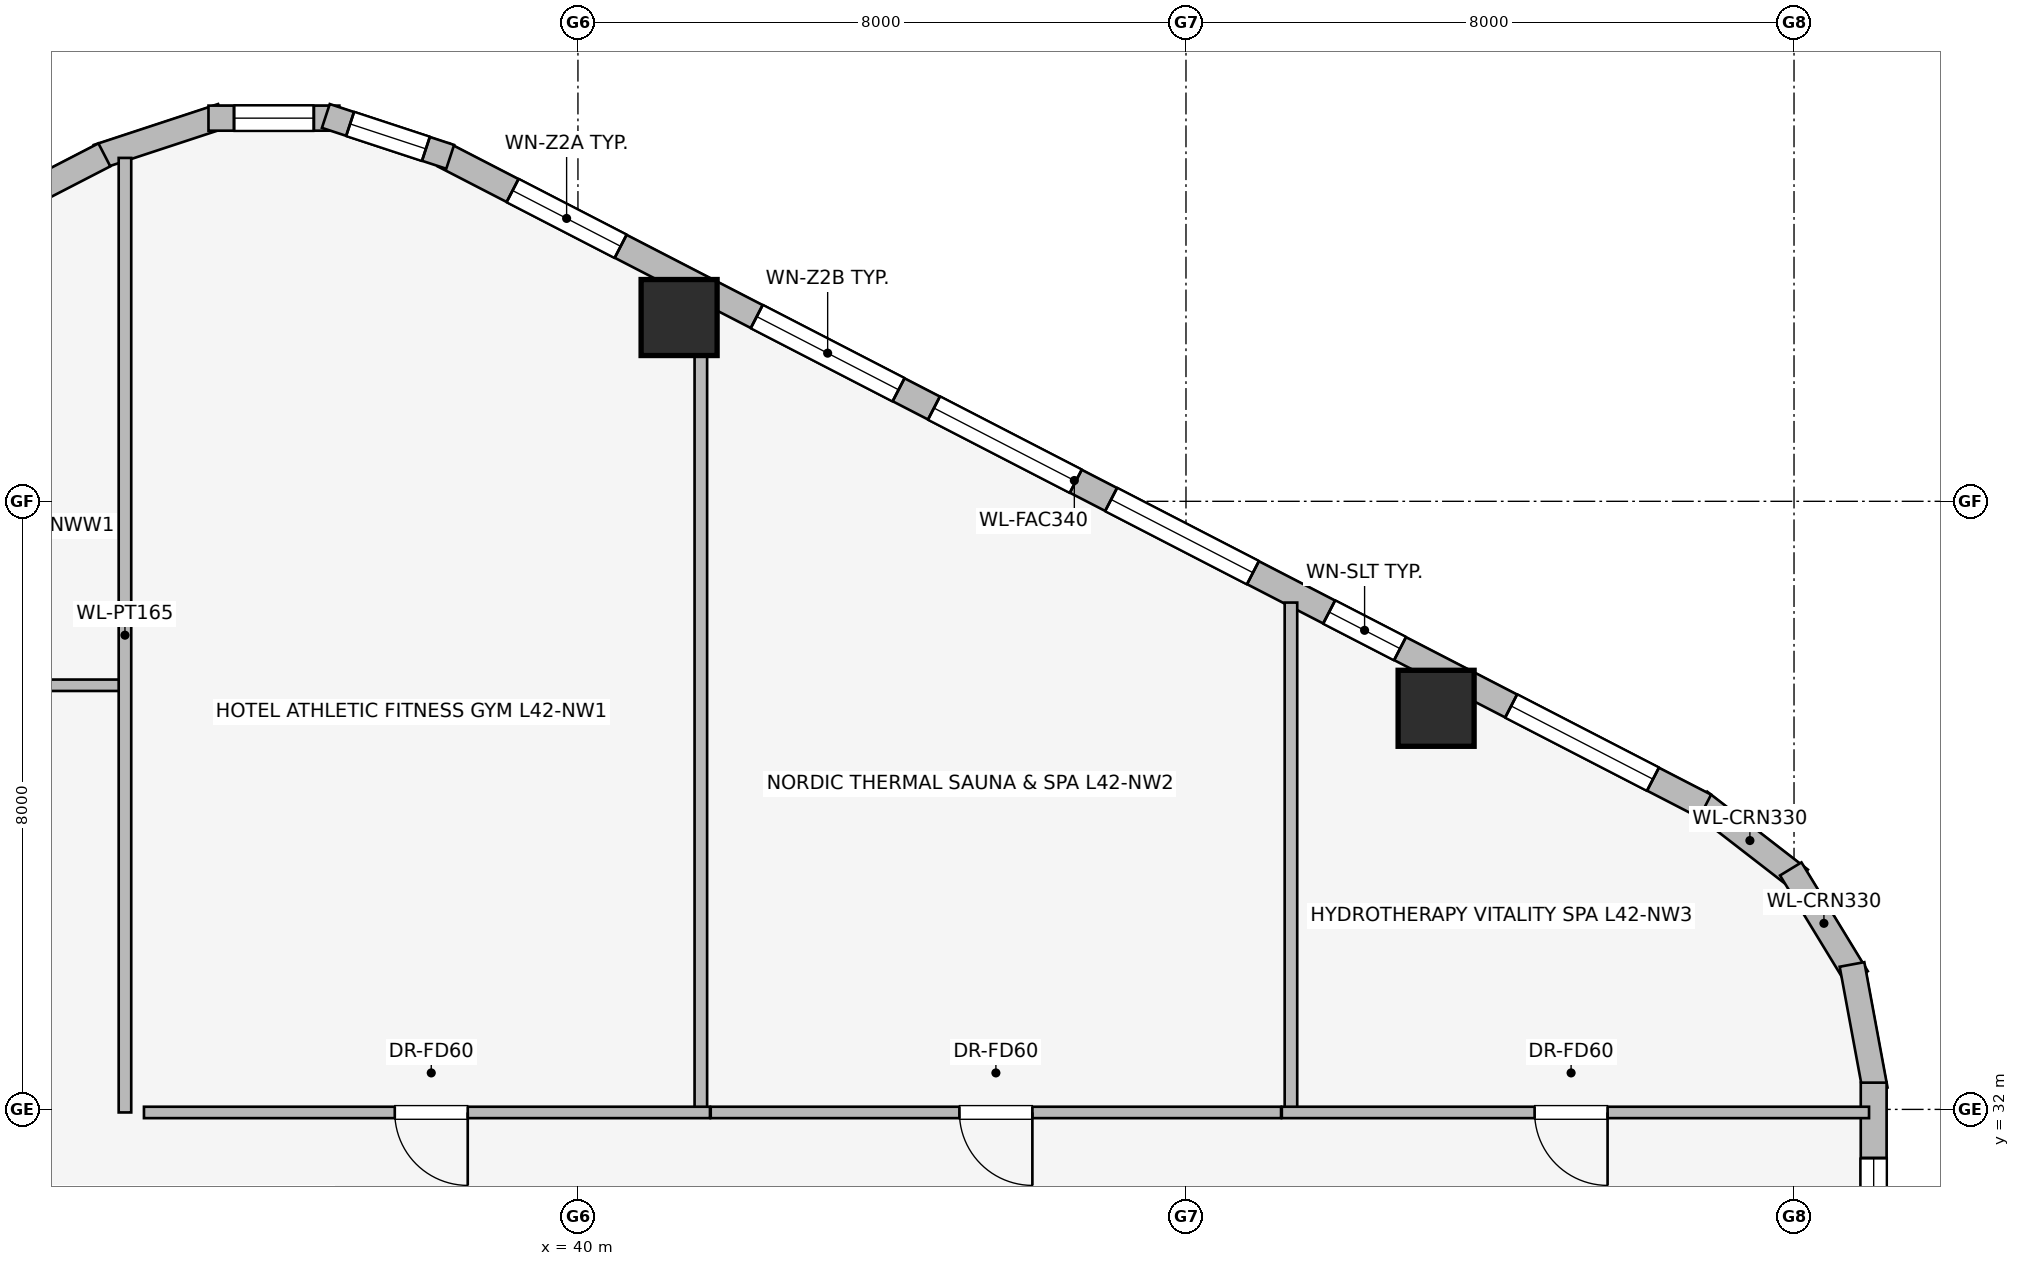
"""IFC4 building model, lengths in metres.
Left out: names, types, materials, properties, quantities, classifications, styles, units other than length and angle.
Written with IfcOpenShell. Run it as: python <this file> out.ifc"""

import sys

from ifc_helpers import new_model, si_unit, direction, frame, frame_2d, origin, origin_2d, place, context, subcontext, project, spatial, rectangle, extrude, element, fill, save


model = new_model("IFC4")
c1 = context("Model", 3, precision=1e-05, world=origin(), true_north=direction((0.0, 1.0)))
c2 = subcontext(c1, "Body", "Model", "MODEL_VIEW")
j1 = project(units=[si_unit("LENGTHUNIT", "METRE"), si_unit("PLANEANGLEUNIT", "RADIAN")], contexts=[c1])
p1 = place(None, origin())
s1 = spatial("IfcSite", under=j1, at=p1, CompositionType="ELEMENT")
p2 = place(p1, origin())
s2 = spatial("IfcBuilding", under=s1, at=p2, CompositionType="ELEMENT")
p3 = place(p2, frame((0.0, 0.0, 156.75)))
s3 = spatial("IfcBuildingStorey", under=s2, at=p3, CompositionType="ELEMENT", Elevation=156.75)
for number, where, z_axis, x_axis in (
    (1, (51.291, 37.277, 0.0), (0.0, 0.0, 1.0), (1.0, 0.0, 0.0)),
    (2, (41.331, 42.418, 0.0), (0.0, 0.0, 1.0), (1.0, 0.0, 0.0)),
):
    element("IfcColumn", number, at=place(p3, frame(where, z_axis=z_axis, x_axis=x_axis)), inside=s3, PredefinedType="COLUMN", context=c2, shape_type="SweptSolid", body=[
        extrude(rectangle(XDim=1.0, YDim=1.0, at=origin_2d()), origin(), (0.0, 0.0, 1.0), 3.45),
    ])
p4 = place(p3, frame((54.757, 36.05, 0.0), z_axis=(0.0, 0.0, 1.0), x_axis=(0.790621329885, -0.612305408053, 0.0)))
e3 = element("IfcWall", 3, at=p4, inside=s3, PredefinedType="STANDARD", context=c2, shape_type="SweptSolid", body=[
    extrude(rectangle(XDim=1.676, YDim=0.33, at=frame_2d((0.838, 0.0))), origin(), (0.0, 0.0, 1.0), 3.19),
])
p5 = place(p3, frame((55.957, 35.164, 0.0), z_axis=(0.0, 0.0, 1.0), x_axis=(0.520519429557, -0.853849824883, 0.0)))
e4 = element("IfcWall", 4, at=p5, inside=s3, PredefinedType="STANDARD", context=c2, shape_type="SweptSolid", body=[
    extrude(rectangle(XDim=1.677, YDim=0.33, at=frame_2d((0.839, 0.0))), origin(), (0.0, 0.0, 1.0), 3.19),
])
p6 = place(p3, frame((56.763, 33.907, 0.0), z_axis=(0.0, 0.0, 1.0), x_axis=(0.181984991895, -0.983301308209, 0.0)))
e5 = element("IfcWall", 5, at=p6, inside=s3, PredefinedType="STANDARD", context=c2, shape_type="SweptSolid", body=[
    extrude(rectangle(XDim=1.677, YDim=0.33, at=frame_2d((0.838, 0.0))), origin(), (0.0, 0.0, 1.0), 3.19),
])
p7 = place(p3, frame((38.231, 44.558, 0.0), z_axis=(0.0, 0.0, 1.0), x_axis=(0.888613612362, -0.458656568606, 0.0)))
e6 = element("IfcWall", 6, at=p7, inside=s3, PredefinedType="STANDARD", context=c2, shape_type="SweptSolid", body=[
    extrude(rectangle(XDim=18.681, YDim=0.34, at=frame_2d((9.34, 0.0))), origin(), (0.0, 0.0, 1.0), 3.19),
])
p8 = place(p7, frame((1.023, 0.0, 0.75)))
e7 = element("IfcOpeningElement", 7, at=p8, cuts=e6, PredefinedType="OPENING", context=c2, shape_type="SweptSolid", body=[
    extrude(rectangle(XDim=1.6, YDim=1.55, at=frame_2d((0.8, 0.775))), frame((0.0, 0.18, 0.0), z_axis=(0.0, -1.0, 0.0), x_axis=(1.0, 0.0, 0.0)), (0.0, 0.0, 1.0), 0.36),
])
p9 = place(p7, frame((4.638, 0.0, 0.75)))
e8 = element("IfcOpeningElement", 8, at=p9, cuts=e6, PredefinedType="OPENING", context=c2, shape_type="SweptSolid", body=[
    extrude(rectangle(XDim=2.1, YDim=1.5, at=frame_2d((1.05, 0.75))), frame((0.0, 0.18, 0.0), z_axis=(0.0, -1.0, 0.0), x_axis=(1.0, 0.0, 0.0)), (0.0, 0.0, 1.0), 0.36),
])
p10 = place(p7, frame((7.262, 0.0, 0.75)))
e9 = element("IfcOpeningElement", 9, at=p10, cuts=e6, PredefinedType="OPENING", context=c2, shape_type="SweptSolid", body=[
    extrude(rectangle(XDim=2.1, YDim=1.5, at=frame_2d((1.05, 0.75))), frame((0.0, 0.18, 0.0), z_axis=(0.0, -1.0, 0.0), x_axis=(1.0, 0.0, 0.0)), (0.0, 0.0, 1.0), 0.36),
])
p11 = place(p7, frame((9.885, 0.0, 0.75)))
e10 = element("IfcOpeningElement", 10, at=p11, cuts=e6, PredefinedType="OPENING", context=c2, shape_type="SweptSolid", body=[
    extrude(rectangle(XDim=2.1, YDim=1.5, at=frame_2d((1.05, 0.75))), frame((0.0, 0.18, 0.0), z_axis=(0.0, -1.0, 0.0), x_axis=(1.0, 0.0, 0.0)), (0.0, 0.0, 1.0), 0.36),
])
p12 = place(p7, frame((13.113, 0.0, 0.75)))
e11 = element("IfcOpeningElement", 11, at=p12, cuts=e6, PredefinedType="OPENING", context=c2, shape_type="SweptSolid", body=[
    extrude(rectangle(XDim=1.05, YDim=1.4, at=frame_2d((0.525, 0.7))), frame((0.0, 0.18, 0.0), z_axis=(0.0, -1.0, 0.0), x_axis=(1.0, 0.0, 0.0)), (0.0, 0.0, 1.0), 0.36),
])
p13 = place(p7, frame((15.808, 0.0, 0.75)))
e12 = element("IfcOpeningElement", 12, at=p13, cuts=e6, PredefinedType="OPENING", context=c2, shape_type="SweptSolid", body=[
    extrude(rectangle(XDim=2.1, YDim=1.5, at=frame_2d((1.05, 0.75))), frame((0.0, 0.18, 0.0), z_axis=(0.0, -1.0, 0.0), x_axis=(1.0, 0.0, 0.0)), (0.0, 0.0, 1.0), 0.36),
])
p14 = place(p3, frame((33.681, 44.532, 0.0), z_axis=(0.0, 0.0, 1.0), x_axis=(0.949937416267, 0.312440242569, 0.0)))
e13 = element("IfcWall", 13, at=p14, inside=s3, PredefinedType="STANDARD", context=c2, shape_type="SweptSolid", body=[
    extrude(rectangle(XDim=1.722, YDim=0.33, at=frame_2d((0.861, 0.0))), origin(), (0.0, 0.0, 1.0), 3.19),
])
p15 = place(p3, frame((35.139, 45.041, 0.0), z_axis=(0.0, 0.0, 1.0), x_axis=(1.0, 0.0, 0.0)))
e14 = element("IfcWall", 14, at=p15, inside=s3, PredefinedType="STANDARD", context=c2, shape_type="SweptSolid", body=[
    extrude(rectangle(XDim=1.722, YDim=0.33, at=frame_2d((0.861, 0.0))), origin(), (0.0, 0.0, 1.0), 3.19),
])
p16 = place(p15, frame((0.336, 0.0, 0.75)))
e15 = element("IfcOpeningElement", 15, at=p16, cuts=e14, PredefinedType="OPENING", context=c2, shape_type="SweptSolid", body=[
    extrude(rectangle(XDim=1.05, YDim=1.4, at=frame_2d((0.525, 0.7))), frame((0.0, 0.175, 0.0), z_axis=(0.0, -1.0, 0.0), x_axis=(1.0, 0.0, 0.0)), (0.0, 0.0, 1.0), 0.35),
])
p17 = place(p3, frame((36.683, 45.07, 0.0), z_axis=(0.0, 0.0, 1.0), x_axis=(0.949937416267, -0.312440242569, 0.0)))
e16 = element("IfcWall", 16, at=p17, inside=s3, PredefinedType="STANDARD", context=c2, shape_type="SweptSolid", body=[
    extrude(rectangle(XDim=1.722, YDim=0.33, at=frame_2d((0.861, 0.0))), origin(), (0.0, 0.0, 1.0), 3.19),
])
p18 = place(p17, frame((0.336, 0.0, 0.75)))
e17 = element("IfcOpeningElement", 17, at=p18, cuts=e16, PredefinedType="OPENING", context=c2, shape_type="SweptSolid", body=[
    extrude(rectangle(XDim=1.05, YDim=1.4, at=frame_2d((0.525, 0.7))), frame((0.0, 0.175, 0.0), z_axis=(0.0, -1.0, 0.0), x_axis=(1.0, 0.0, 0.0)), (0.0, 0.0, 1.0), 0.35),
])
p19 = place(p3, frame((17.169, 35.99, 0.0), z_axis=(0.0, 0.0, 1.0), x_axis=(0.888613612362, 0.458656568606, 0.0)))
e18 = element("IfcWall", 18, at=p19, inside=s3, PredefinedType="STANDARD", context=c2, shape_type="SweptSolid", body=[
    extrude(rectangle(XDim=18.681, YDim=0.34, at=frame_2d((9.34, 0.0))), origin(), (0.0, 0.0, 1.0), 3.19),
])
p20 = place(p19, frame((1.023, 0.0, 0.75)))
e19 = element("IfcOpeningElement", 19, at=p20, cuts=e18, PredefinedType="OPENING", context=c2, shape_type="SweptSolid", body=[
    extrude(rectangle(XDim=1.6, YDim=1.55, at=frame_2d((0.8, 0.775))), frame((0.0, 0.18, 0.0), z_axis=(0.0, -1.0, 0.0), x_axis=(1.0, 0.0, 0.0)), (0.0, 0.0, 1.0), 0.36),
])
p21 = place(p19, frame((4.981, 0.0, 0.75)))
e20 = element("IfcOpeningElement", 20, at=p21, cuts=e18, PredefinedType="OPENING", context=c2, shape_type="SweptSolid", body=[
    extrude(rectangle(XDim=2.1, YDim=1.5, at=frame_2d((1.05, 0.75))), frame((0.0, 0.18, 0.0), z_axis=(0.0, -1.0, 0.0), x_axis=(1.0, 0.0, 0.0)), (0.0, 0.0, 1.0), 0.36),
])
p22 = place(p19, frame((8.29, 0.0, 0.75)))
e21 = element("IfcOpeningElement", 21, at=p22, cuts=e18, PredefinedType="OPENING", context=c2, shape_type="SweptSolid", body=[
    extrude(rectangle(XDim=2.1, YDim=1.5, at=frame_2d((1.05, 0.75))), frame((0.0, 0.18, 0.0), z_axis=(0.0, -1.0, 0.0), x_axis=(1.0, 0.0, 0.0)), (0.0, 0.0, 1.0), 0.36),
])
p23 = place(p19, frame((11.6, 0.0, 0.75)))
e22 = element("IfcOpeningElement", 22, at=p23, cuts=e18, PredefinedType="OPENING", context=c2, shape_type="SweptSolid", body=[
    extrude(rectangle(XDim=2.1, YDim=1.5, at=frame_2d((1.05, 0.75))), frame((0.0, 0.18, 0.0), z_axis=(0.0, -1.0, 0.0), x_axis=(1.0, 0.0, 0.0)), (0.0, 0.0, 1.0), 0.36),
])
p24 = place(p19, frame((16.058, 0.0, 0.75)))
e23 = element("IfcOpeningElement", 23, at=p24, cuts=e18, PredefinedType="OPENING", context=c2, shape_type="SweptSolid", body=[
    extrude(rectangle(XDim=1.6, YDim=1.55, at=frame_2d((0.8, 0.775))), frame((0.0, 0.18, 0.0), z_axis=(0.0, -1.0, 0.0), x_axis=(1.0, 0.0, 0.0)), (0.0, 0.0, 1.0), 0.36),
])
p25 = place(p3, frame((57.048, 32.352, 0.0), z_axis=(0.0, 0.0, 1.0), x_axis=(0.0, -1.0, 0.0)))
e24 = element("IfcWall", 24, at=p25, inside=s3, PredefinedType="STANDARD", context=c2, shape_type="SweptSolid", body=[
    extrude(rectangle(XDim=16.704, YDim=0.34, at=frame_2d((8.352, 0.0))), origin(), (0.0, 0.0, 1.0), 3.19),
])
p26 = place(p25, frame((0.992, 0.0, 0.75)))
e25 = element("IfcOpeningElement", 25, at=p26, cuts=e24, PredefinedType="OPENING", context=c2, shape_type="SweptSolid", body=[
    extrude(rectangle(XDim=1.05, YDim=1.4, at=frame_2d((0.525, 0.7))), frame((0.0, 0.18, 0.0), z_axis=(0.0, -1.0, 0.0), x_axis=(1.0, 0.0, 0.0)), (0.0, 0.0, 1.0), 0.36),
])
p27 = place(p25, frame((4.935, 0.0, 0.75)))
e26 = element("IfcOpeningElement", 26, at=p27, cuts=e24, PredefinedType="OPENING", context=c2, shape_type="SweptSolid", body=[
    extrude(rectangle(XDim=2.1, YDim=1.5, at=frame_2d((1.05, 0.75))), frame((0.0, 0.18, 0.0), z_axis=(0.0, -1.0, 0.0), x_axis=(1.0, 0.0, 0.0)), (0.0, 0.0, 1.0), 0.36),
])
p28 = place(p25, frame((9.919, 0.0, 0.75)))
e27 = element("IfcOpeningElement", 27, at=p28, cuts=e24, PredefinedType="OPENING", context=c2, shape_type="SweptSolid", body=[
    extrude(rectangle(XDim=1.6, YDim=1.55, at=frame_2d((0.8, 0.775))), frame((0.0, 0.18, 0.0), z_axis=(0.0, -1.0, 0.0), x_axis=(1.0, 0.0, 0.0)), (0.0, 0.0, 1.0), 0.36),
])
p29 = place(p25, frame((14.702, 0.0, 0.75)))
e28 = element("IfcOpeningElement", 28, at=p29, cuts=e24, PredefinedType="OPENING", context=c2, shape_type="SweptSolid", body=[
    extrude(rectangle(XDim=1.05, YDim=1.4, at=frame_2d((0.525, 0.7))), frame((0.0, 0.18, 0.0), z_axis=(0.0, -1.0, 0.0), x_axis=(1.0, 0.0, 0.0)), (0.0, 0.0, 1.0), 0.36),
])
p30 = place(p3, frame((34.0, 37.58, 0.0), z_axis=(0.0, 0.0, 1.0), x_axis=(-1.0, 0.0, 0.0)))
e29 = element("IfcWall", 29, at=p30, inside=s3, PredefinedType="PARTITIONING", context=c2, shape_type="SweptSolid", body=[
    extrude(rectangle(XDim=13.707, YDim=0.15, at=frame_2d((6.854, 0.0))), origin(), (0.0, 0.0, 1.0), 2.582),
])
p31 = place(p30, frame((5.195, 0.0, 0.0)))
e30 = element("IfcOpeningElement", 30, at=p31, cuts=e29, PredefinedType="OPENING", context=c2, shape_type="SweptSolid", body=[
    extrude(rectangle(XDim=0.96, YDim=2.0, at=frame_2d((0.48, 1.0))), frame((0.0, 0.085, 0.0), z_axis=(0.0, -1.0, 0.0), x_axis=(1.0, 0.0, 0.0)), (0.0, 0.0, 1.0), 0.17),
])
p32 = place(p3, frame((34.04, 31.96, 0.0), z_axis=(0.0, 0.0, 1.0), x_axis=(0.0, 1.0, 0.0)))
e31 = element("IfcWall", 31, at=p32, inside=s3, PredefinedType="PARTITIONING", context=c2, shape_type="SweptSolid", body=[
    extrude(rectangle(XDim=12.558, YDim=0.165, at=frame_2d((6.279, 0.0))), origin(), (0.0, 0.0, 1.0), 3.19),
])
p33 = place(p3, frame((41.617, 31.97, 0.0), z_axis=(0.0, 0.0, 1.0), x_axis=(0.0, 1.0, 0.0)))
e32 = element("IfcWall", 32, at=p33, inside=s3, PredefinedType="PARTITIONING", context=c2, shape_type="SweptSolid", body=[
    extrude(rectangle(XDim=10.705, YDim=0.165, at=frame_2d((5.353, 0.0))), origin(), (0.0, 0.0, 1.0), 2.42),
])
p34 = place(p3, frame((49.381, 31.97, 0.0), z_axis=(0.0, 0.0, 1.0), x_axis=(0.0, 1.0, 0.0)))
e33 = element("IfcWall", 33, at=p34, inside=s3, PredefinedType="PARTITIONING", context=c2, shape_type="SweptSolid", body=[
    extrude(rectangle(XDim=6.698, YDim=0.165, at=frame_2d((3.349, 0.0))), origin(), (0.0, 0.0, 1.0), 3.19),
])
p35 = place(p3, frame((41.737, 31.96, 0.0), z_axis=(0.0, 0.0, 1.0), x_axis=(-1.0, 0.0, 0.0)))
e34 = element("IfcWall", 34, at=p35, inside=s3, PredefinedType="PARTITIONING", context=c2, shape_type="SweptSolid", body=[
    extrude(rectangle(XDim=7.447, YDim=0.15, at=frame_2d((3.724, 0.0))), origin(), (0.0, 0.0, 1.0), 3.19),
])
p36 = place(p35, frame((3.187, 0.0, 0.0)))
e35 = element("IfcOpeningElement", 35, at=p36, cuts=e34, PredefinedType="OPENING", context=c2, shape_type="SweptSolid", body=[
    extrude(rectangle(XDim=0.96, YDim=2.0, at=frame_2d((0.48, 1.0))), frame((0.0, 0.085, 0.0), z_axis=(0.0, -1.0, 0.0), x_axis=(1.0, 0.0, 0.0)), (0.0, 0.0, 1.0), 0.17),
])
p37 = place(p3, frame((49.251, 31.96, 0.0), z_axis=(0.0, 0.0, 1.0), x_axis=(-1.0, 0.0, 0.0)))
e36 = element("IfcWall", 36, at=p37, inside=s3, PredefinedType="PARTITIONING", context=c2, shape_type="SweptSolid", body=[
    extrude(rectangle(XDim=7.504, YDim=0.15, at=frame_2d((3.752, 0.0))), origin(), (0.0, 0.0, 1.0), 3.19),
])
p38 = place(p37, frame((3.272, 0.0, 0.0)))
e37 = element("IfcOpeningElement", 37, at=p38, cuts=e36, PredefinedType="OPENING", context=c2, shape_type="SweptSolid", body=[
    extrude(rectangle(XDim=0.96, YDim=2.0, at=frame_2d((0.48, 1.0))), frame((0.0, 0.085, 0.0), z_axis=(0.0, -1.0, 0.0), x_axis=(1.0, 0.0, 0.0)), (0.0, 0.0, 1.0), 0.17),
])
p39 = place(p3, frame((56.987, 31.96, 0.0), z_axis=(0.0, 0.0, 1.0), x_axis=(-1.0, 0.0, 0.0)))
e38 = element("IfcWall", 38, at=p39, inside=s3, PredefinedType="PARTITIONING", context=c2, shape_type="SweptSolid", body=[
    extrude(rectangle(XDim=7.726, YDim=0.15, at=frame_2d((3.863, 0.0))), origin(), (0.0, 0.0, 1.0), 3.19),
])
p40 = place(p39, frame((3.44, 0.0, 0.0)))
e39 = element("IfcOpeningElement", 39, at=p40, cuts=e38, PredefinedType="OPENING", context=c2, shape_type="SweptSolid", body=[
    extrude(rectangle(XDim=0.96, YDim=2.0, at=frame_2d((0.48, 1.0))), frame((0.0, 0.085, 0.0), z_axis=(0.0, -1.0, 0.0), x_axis=(1.0, 0.0, 0.0)), (0.0, 0.0, 1.0), 0.17),
])
p41 = place(p8, origin())
e40 = element("IfcWindow", 40, at=p41, inside=s3, PartitioningType="SINGLE_PANEL", PredefinedType="WINDOW", context=c2, shape_type="SweptSolid", body=[
    extrude(rectangle(XDim=1.6, YDim=1.55, at=frame_2d((0.8, 0.775))), frame((0.0, 0.03, 0.0), z_axis=(0.0, -1.0, 0.0), x_axis=(1.0, 0.0, 0.0)), (0.0, 0.0, 1.0), 0.06),
])
fill(e7, e40)
p42 = place(p9, origin())
e41 = element("IfcWindow", 41, at=p42, inside=s3, PartitioningType="SINGLE_PANEL", PredefinedType="WINDOW", context=c2, shape_type="SweptSolid", body=[
    extrude(rectangle(XDim=2.1, YDim=1.5, at=frame_2d((1.05, 0.75))), frame((0.0, 0.03, 0.0), z_axis=(0.0, -1.0, 0.0), x_axis=(1.0, 0.0, 0.0)), (0.0, 0.0, 1.0), 0.06),
])
fill(e8, e41)
p43 = place(p10, origin())
e42 = element("IfcWindow", 42, at=p43, inside=s3, PartitioningType="SINGLE_PANEL", PredefinedType="WINDOW", context=c2, shape_type="SweptSolid", body=[
    extrude(rectangle(XDim=2.1, YDim=1.5, at=frame_2d((1.05, 0.75))), frame((0.0, 0.03, 0.0), z_axis=(0.0, -1.0, 0.0), x_axis=(1.0, 0.0, 0.0)), (0.0, 0.0, 1.0), 0.06),
])
fill(e9, e42)
p44 = place(p11, origin())
e43 = element("IfcWindow", 43, at=p44, inside=s3, PartitioningType="SINGLE_PANEL", PredefinedType="WINDOW", context=c2, shape_type="SweptSolid", body=[
    extrude(rectangle(XDim=2.1, YDim=1.5, at=frame_2d((1.05, 0.75))), frame((0.0, 0.03, 0.0), z_axis=(0.0, -1.0, 0.0), x_axis=(1.0, 0.0, 0.0)), (0.0, 0.0, 1.0), 0.06),
])
fill(e10, e43)
p45 = place(p12, origin())
e44 = element("IfcWindow", 44, at=p45, inside=s3, PartitioningType="SINGLE_PANEL", PredefinedType="WINDOW", context=c2, shape_type="SweptSolid", body=[
    extrude(rectangle(XDim=1.05, YDim=1.4, at=frame_2d((0.525, 0.7))), frame((0.0, 0.03, 0.0), z_axis=(0.0, -1.0, 0.0), x_axis=(1.0, 0.0, 0.0)), (0.0, 0.0, 1.0), 0.06),
])
fill(e11, e44)
p46 = place(p13, origin())
e45 = element("IfcWindow", 45, at=p46, inside=s3, PartitioningType="SINGLE_PANEL", PredefinedType="WINDOW", context=c2, shape_type="SweptSolid", body=[
    extrude(rectangle(XDim=2.1, YDim=1.5, at=frame_2d((1.05, 0.75))), frame((0.0, 0.03, 0.0), z_axis=(0.0, -1.0, 0.0), x_axis=(1.0, 0.0, 0.0)), (0.0, 0.0, 1.0), 0.06),
])
fill(e12, e45)
p47 = place(p16, origin())
e46 = element("IfcWindow", 46, at=p47, inside=s3, PartitioningType="SINGLE_PANEL", PredefinedType="WINDOW", context=c2, shape_type="SweptSolid", body=[
    extrude(rectangle(XDim=1.05, YDim=1.4, at=frame_2d((0.525, 0.7))), frame((0.0, 0.03, 0.0), z_axis=(0.0, -1.0, 0.0), x_axis=(1.0, 0.0, 0.0)), (0.0, 0.0, 1.0), 0.06),
])
fill(e15, e46)
p48 = place(p18, origin())
e47 = element("IfcWindow", 47, at=p48, inside=s3, PartitioningType="SINGLE_PANEL", PredefinedType="WINDOW", context=c2, shape_type="SweptSolid", body=[
    extrude(rectangle(XDim=1.05, YDim=1.4, at=frame_2d((0.525, 0.7))), frame((0.0, 0.03, 0.0), z_axis=(0.0, -1.0, 0.0), x_axis=(1.0, 0.0, 0.0)), (0.0, 0.0, 1.0), 0.06),
])
fill(e17, e47)
p49 = place(p26, origin())
e48 = element("IfcWindow", 48, at=p49, inside=s3, PartitioningType="SINGLE_PANEL", PredefinedType="WINDOW", context=c2, shape_type="SweptSolid", body=[
    extrude(rectangle(XDim=1.05, YDim=1.4, at=frame_2d((0.525, 0.7))), frame((0.0, 0.03, 0.0), z_axis=(0.0, -1.0, 0.0), x_axis=(1.0, 0.0, 0.0)), (0.0, 0.0, 1.0), 0.06),
])
fill(e25, e48)
p50 = place(p36, origin())
e49 = element("IfcDoor", 49, at=p50, inside=s3, OperationType="SINGLE_SWING_LEFT", PredefinedType="DOOR", context=c2, shape_type="SweptSolid", body=[
    extrude(rectangle(XDim=0.96, YDim=2.0, at=frame_2d((0.48, 1.0))), frame((0.0, 0.025, 0.0), z_axis=(0.0, -1.0, 0.0), x_axis=(1.0, 0.0, 0.0)), (0.0, 0.0, 1.0), 0.05),
])
fill(e35, e49)
p51 = place(p38, origin())
e50 = element("IfcDoor", 50, at=p51, inside=s3, OperationType="SINGLE_SWING_LEFT", PredefinedType="DOOR", context=c2, shape_type="SweptSolid", body=[
    extrude(rectangle(XDim=0.96, YDim=2.0, at=frame_2d((0.48, 1.0))), frame((0.0, 0.025, 0.0), z_axis=(0.0, -1.0, 0.0), x_axis=(1.0, 0.0, 0.0)), (0.0, 0.0, 1.0), 0.05),
])
fill(e37, e50)
p52 = place(p40, origin())
e51 = element("IfcDoor", 51, at=p52, inside=s3, OperationType="SINGLE_SWING_LEFT", PredefinedType="DOOR", context=c2, shape_type="SweptSolid", body=[
    extrude(rectangle(XDim=0.96, YDim=2.0, at=frame_2d((0.48, 1.0))), frame((0.0, 0.025, 0.0), z_axis=(0.0, -1.0, 0.0), x_axis=(1.0, 0.0, 0.0)), (0.0, 0.0, 1.0), 0.05),
])
fill(e39, e51)
save(model, sys.argv[1])
